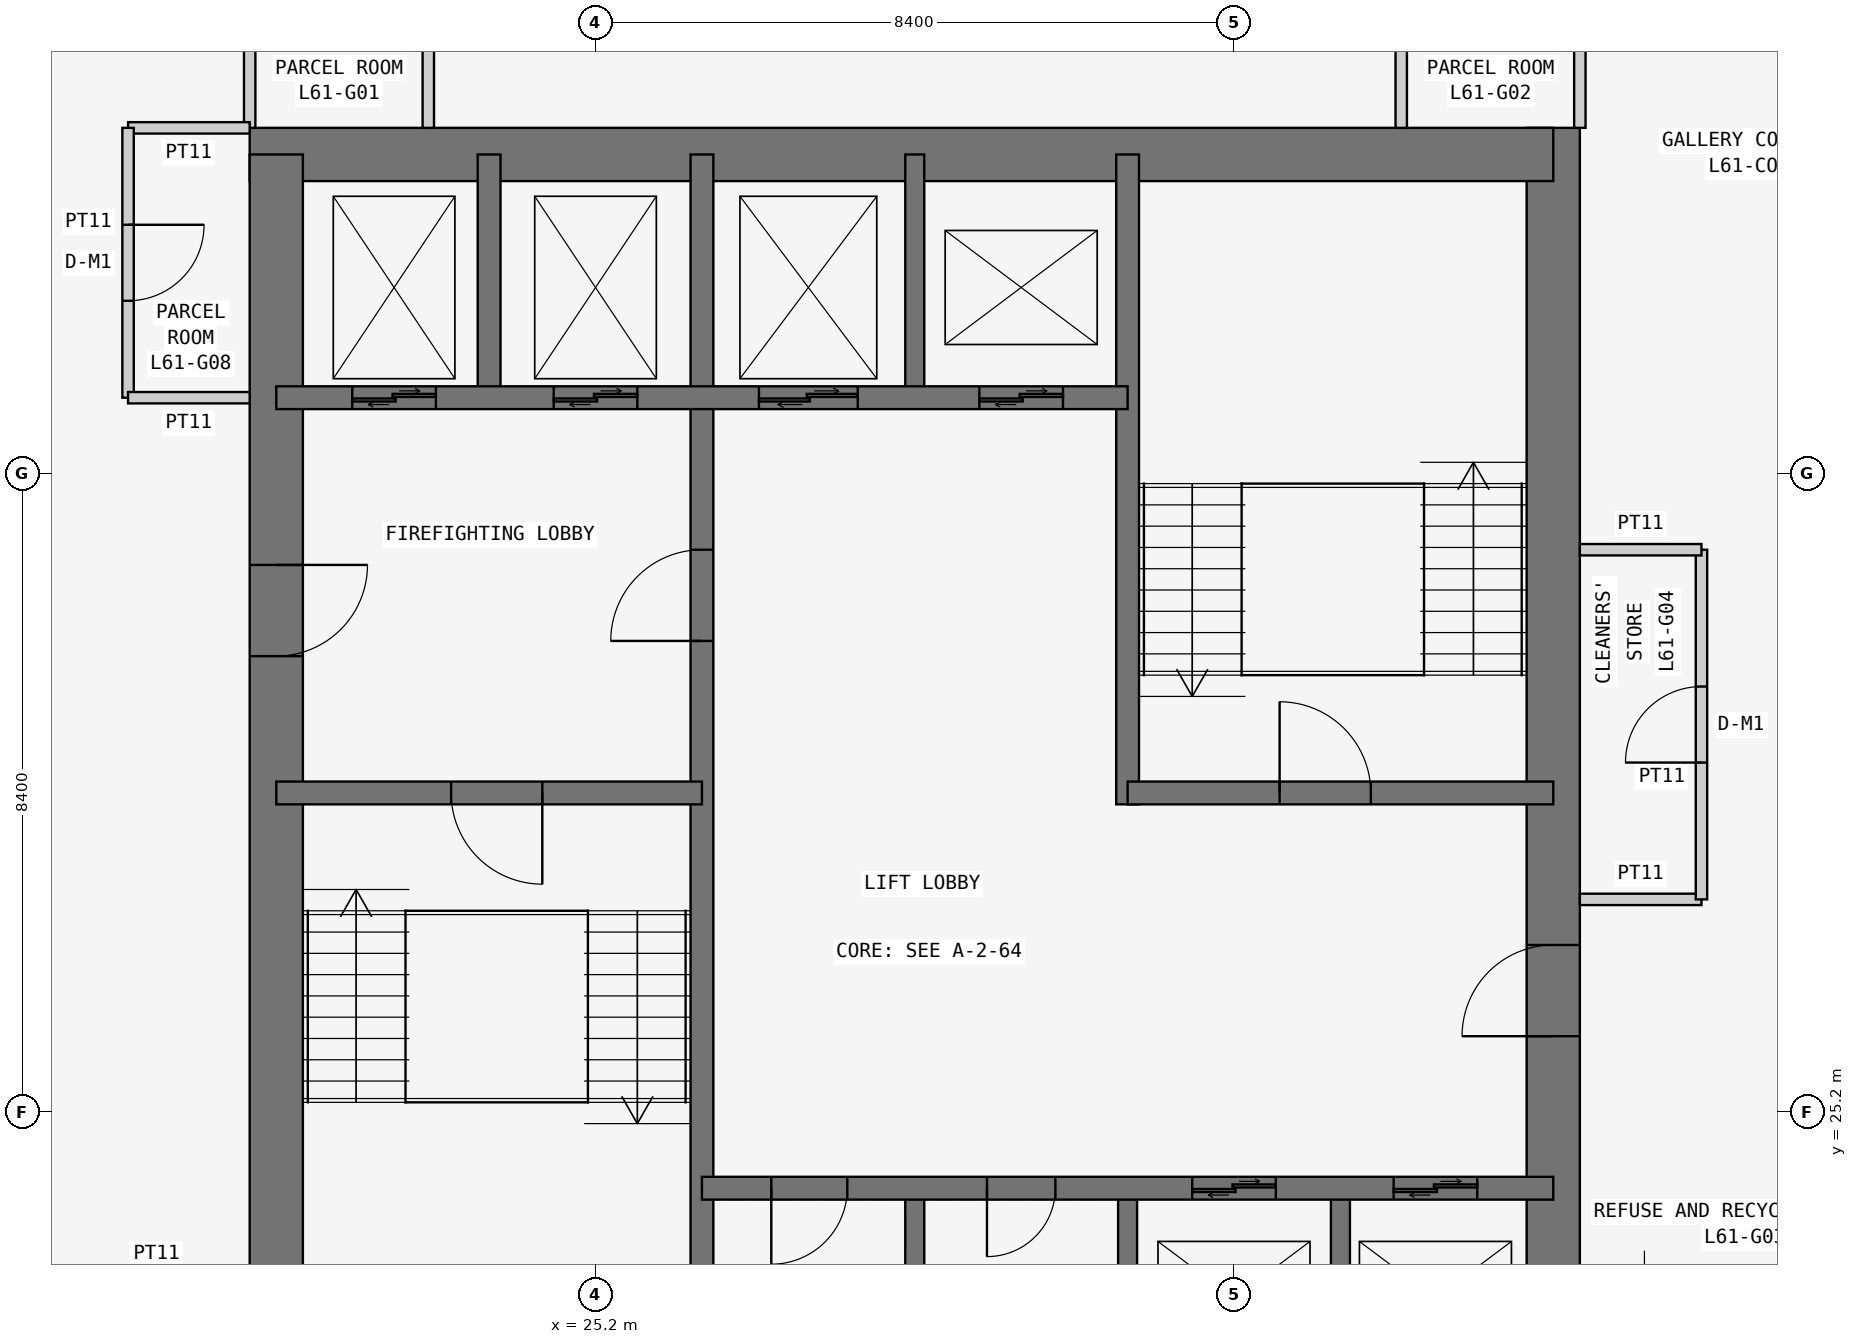
"""IFC4 building model, lengths in metres.
Left out: names, types, materials, properties, quantities, classifications, styles, units other than length and angle.
Written with IfcOpenShell. Run it as: python <this file> out.ifc"""

import sys

from ifc_helpers import new_model, si_unit, direction, frame, frame_2d, origin, place, context, subcontext, project, spatial, rectangle, extrude, element, fill, save


model = new_model("IFC4")
c1 = context("Model", 3, precision=1e-05, world=origin(), true_north=direction((0.0, 1.0)))
c2 = subcontext(c1, "Body", "Model", "MODEL_VIEW")
j1 = project(units=[si_unit("LENGTHUNIT", "METRE"), si_unit("PLANEANGLEUNIT", "RADIAN")], contexts=[c1])
p1 = place(None, origin())
s1 = spatial("IfcSite", under=j1, at=p1, CompositionType="ELEMENT")
p2 = place(p1, origin())
s2 = spatial("IfcBuilding", under=s1, at=p2, CompositionType="ELEMENT")
p3 = place(p2, frame((0.0, 0.0, 233.7)))
s3 = spatial("IfcBuildingStorey", under=s2, at=p3, CompositionType="ELEMENT", Elevation=233.7)
p4 = place(p3, frame((37.8, 21.0, 0.0), z_axis=(0.0, 0.0, 1.0), x_axis=(0.0, 1.0, 0.0)))
e1 = element("IfcWall", 1, at=p4, inside=s3, PredefinedType="SHEAR", context=c2, shape_type="SweptSolid", body=[
    extrude(rectangle(XDim=17.15, YDim=0.7, at=frame_2d((8.575, 0.0))), origin(), (0.0, 0.0, 1.0), 3.6),
])
p5 = place(p4, frame((5.2, 0.0, 0.0)))
e2 = element("IfcOpeningElement", 2, at=p5, cuts=e1, PredefinedType="OPENING", context=c2, shape_type="SweptSolid", body=[
    extrude(rectangle(XDim=1.2, YDim=2.1, at=frame_2d((0.6, 1.05))), frame((0.0, 0.36, 0.0), z_axis=(0.0, -1.0, 0.0), x_axis=(1.0, 0.0, 0.0)), (0.0, 0.0, 1.0), 0.72),
])
p6 = place(p3, frame((37.8, 37.8, 0.0), z_axis=(0.0, 0.0, 1.0), x_axis=(-1.0, 0.0, 0.0)))
e3 = element("IfcWall", 3, at=p6, inside=s3, PredefinedType="SHEAR", context=c2, shape_type="SweptSolid", body=[
    extrude(rectangle(XDim=17.15, YDim=0.7, at=frame_2d((8.575, 0.0))), origin(), (0.0, 0.0, 1.0), 3.6),
])
p7 = place(p3, frame((21.0, 37.8, 0.0), z_axis=(0.0, 0.0, 1.0), x_axis=(0.0, -1.0, 0.0)))
e4 = element("IfcWall", 4, at=p7, inside=s3, PredefinedType="SHEAR", context=c2, shape_type="SweptSolid", body=[
    extrude(rectangle(XDim=17.15, YDim=0.7, at=frame_2d((8.575, 0.0))), origin(), (0.0, 0.0, 1.0), 3.6),
])
p8 = place(p7, frame((5.4, 0.0, 0.0)))
e5 = element("IfcOpeningElement", 5, at=p8, cuts=e4, PredefinedType="OPENING", context=c2, shape_type="SweptSolid", body=[
    extrude(rectangle(XDim=1.2, YDim=2.1, at=frame_2d((0.6, 1.05))), frame((0.0, 0.36, 0.0), z_axis=(0.0, -1.0, 0.0), x_axis=(1.0, 0.0, 0.0)), (0.0, 0.0, 1.0), 0.72),
])
p9 = place(p3, frame((26.6, 21.0, 0.0), z_axis=(0.0, 0.0, 1.0), x_axis=(0.0, 1.0, 0.0)))
e6 = element("IfcWall", 6, at=p9, inside=s3, PredefinedType="SHEAR", context=c2, shape_type="SweptSolid", body=[
    extrude(rectangle(XDim=16.8, YDim=0.3, at=frame_2d((8.4, 0.0))), origin(), (0.0, 0.0, 1.0), 3.6),
])
p10 = place(p9, frame((10.4, 0.0, 0.0)))
e7 = element("IfcOpeningElement", 7, at=p10, cuts=e6, PredefinedType="OPENING", context=c2, shape_type="SweptSolid", body=[
    extrude(rectangle(XDim=1.2, YDim=2.1, at=frame_2d((0.6, 1.05))), frame((0.0, 0.16, 0.0), z_axis=(0.0, -1.0, 0.0), x_axis=(1.0, 0.0, 0.0)), (0.0, 0.0, 1.0), 0.32),
])
p11 = place(p3, frame((21.0, 29.4, 0.0), z_axis=(0.0, 0.0, 1.0), x_axis=(1.0, 0.0, 0.0)))
e8 = element("IfcWall", 8, at=p11, inside=s3, PredefinedType="SHEAR", context=c2, shape_type="SweptSolid", body=[
    extrude(rectangle(XDim=5.6, YDim=0.3, at=frame_2d((2.8, 0.0))), origin(), (0.0, 0.0, 1.0), 3.6),
])
p12 = place(p11, frame((2.3, 0.0, 0.0)))
e9 = element("IfcOpeningElement", 9, at=p12, cuts=e8, PredefinedType="OPENING", context=c2, shape_type="SweptSolid", body=[
    extrude(rectangle(XDim=1.2, YDim=2.1, at=frame_2d((0.6, 1.05))), frame((0.0, 0.16, 0.0), z_axis=(0.0, -1.0, 0.0), x_axis=(1.0, 0.0, 0.0)), (0.0, 0.0, 1.0), 0.32),
])
p13 = place(p3, frame((21.0, 34.6, 0.0), z_axis=(0.0, 0.0, 1.0), x_axis=(1.0, 0.0, 0.0)))
e10 = element("IfcWall", 10, at=p13, inside=s3, PredefinedType="SHEAR", context=c2, shape_type="SweptSolid", body=[
    extrude(rectangle(XDim=11.2, YDim=0.3, at=frame_2d((5.6, 0.0))), origin(), (0.0, 0.0, 1.0), 3.6),
])
p14 = place(p13, frame((9.25, 0.0, 0.0)))
e11 = element("IfcOpeningElement", 11, at=p14, cuts=e10, PredefinedType="OPENING", context=c2, shape_type="SweptSolid", body=[
    extrude(rectangle(XDim=1.1, YDim=2.1, at=frame_2d((0.55, 1.05))), frame((0.0, 0.16, 0.0), z_axis=(0.0, -1.0, 0.0), x_axis=(1.0, 0.0, 0.0)), (0.0, 0.0, 1.0), 0.32),
])
p15 = place(p13, frame((1.0, 0.0, 0.0)))
e12 = element("IfcOpeningElement", 12, at=p15, cuts=e10, PredefinedType="OPENING", context=c2, shape_type="SweptSolid", body=[
    extrude(rectangle(XDim=1.1, YDim=2.1, at=frame_2d((0.55, 1.05))), frame((0.0, 0.16, 0.0), z_axis=(0.0, -1.0, 0.0), x_axis=(1.0, 0.0, 0.0)), (0.0, 0.0, 1.0), 0.32),
])
p16 = place(p13, frame((3.65, 0.0, 0.0)))
e13 = element("IfcOpeningElement", 13, at=p16, cuts=e10, PredefinedType="OPENING", context=c2, shape_type="SweptSolid", body=[
    extrude(rectangle(XDim=1.1, YDim=2.1, at=frame_2d((0.55, 1.05))), frame((0.0, 0.16, 0.0), z_axis=(0.0, -1.0, 0.0), x_axis=(1.0, 0.0, 0.0)), (0.0, 0.0, 1.0), 0.32),
])
p17 = place(p13, frame((6.35, 0.0, 0.0)))
e14 = element("IfcOpeningElement", 14, at=p17, cuts=e10, PredefinedType="OPENING", context=c2, shape_type="SweptSolid", body=[
    extrude(rectangle(XDim=1.3, YDim=2.1, at=frame_2d((0.65, 1.05))), frame((0.0, 0.16, 0.0), z_axis=(0.0, -1.0, 0.0), x_axis=(1.0, 0.0, 0.0)), (0.0, 0.0, 1.0), 0.32),
])
p18 = place(p3, frame((23.8, 34.6, 0.0), z_axis=(0.0, 0.0, 1.0), x_axis=(0.0, 1.0, 0.0)))
e15 = element("IfcWall", 15, at=p18, inside=s3, PredefinedType="SHEAR", context=c2, shape_type="SweptSolid", body=[
    extrude(rectangle(XDim=3.2, YDim=0.3, at=frame_2d((1.6, 0.0))), origin(), (0.0, 0.0, 1.0), 3.6),
])
p19 = place(p3, frame((26.6, 24.2, 0.0), z_axis=(0.0, 0.0, 1.0), x_axis=(1.0, 0.0, 0.0)))
e16 = element("IfcWall", 16, at=p19, inside=s3, PredefinedType="SHEAR", context=c2, shape_type="SweptSolid", body=[
    extrude(rectangle(XDim=11.2, YDim=0.3, at=frame_2d((5.6, 0.0))), origin(), (0.0, 0.0, 1.0), 3.6),
])
p20 = place(p19, frame((0.913, 0.0, 0.0)))
e17 = element("IfcOpeningElement", 17, at=p20, cuts=e16, PredefinedType="OPENING", context=c2, shape_type="SweptSolid", body=[
    extrude(rectangle(XDim=1.0, YDim=2.1, at=frame_2d((0.5, 1.05))), frame((0.0, 0.16, 0.0), z_axis=(0.0, -1.0, 0.0), x_axis=(1.0, 0.0, 0.0)), (0.0, 0.0, 1.0), 0.32),
])
p21 = place(p19, frame((3.75, 0.0, 0.0)))
e18 = element("IfcOpeningElement", 18, at=p21, cuts=e16, PredefinedType="OPENING", context=c2, shape_type="SweptSolid", body=[
    extrude(rectangle(XDim=0.9, YDim=2.1, at=frame_2d((0.45, 1.05))), frame((0.0, 0.16, 0.0), z_axis=(0.0, -1.0, 0.0), x_axis=(1.0, 0.0, 0.0)), (0.0, 0.0, 1.0), 0.32),
])
p22 = place(p19, frame((6.45, 0.0, 0.0)))
e19 = element("IfcOpeningElement", 19, at=p22, cuts=e16, PredefinedType="OPENING", context=c2, shape_type="SweptSolid", body=[
    extrude(rectangle(XDim=1.1, YDim=2.1, at=frame_2d((0.55, 1.05))), frame((0.0, 0.16, 0.0), z_axis=(0.0, -1.0, 0.0), x_axis=(1.0, 0.0, 0.0)), (0.0, 0.0, 1.0), 0.32),
])
p23 = place(p19, frame((9.1, 0.0, 0.0)))
e20 = element("IfcOpeningElement", 20, at=p23, cuts=e16, PredefinedType="OPENING", context=c2, shape_type="SweptSolid", body=[
    extrude(rectangle(XDim=1.1, YDim=2.1, at=frame_2d((0.55, 1.05))), frame((0.0, 0.16, 0.0), z_axis=(0.0, -1.0, 0.0), x_axis=(1.0, 0.0, 0.0)), (0.0, 0.0, 1.0), 0.32),
])
p24 = place(p3, frame((32.2, 29.25, 0.0), z_axis=(0.0, 0.0, 1.0), x_axis=(0.0, 1.0, 0.0)))
e21 = element("IfcWall", 21, at=p24, inside=s3, PredefinedType="SHEAR", context=c2, shape_type="SweptSolid", body=[
    extrude(rectangle(XDim=8.55, YDim=0.3, at=frame_2d((4.275, 0.0))), origin(), (0.0, 0.0, 1.0), 3.6),
])
p25 = place(p3, frame((32.2, 29.4, 0.0), z_axis=(0.0, 0.0, 1.0), x_axis=(1.0, 0.0, 0.0)))
e22 = element("IfcWall", 22, at=p25, inside=s3, PredefinedType="SHEAR", context=c2, shape_type="SweptSolid", body=[
    extrude(rectangle(XDim=5.6, YDim=0.3, at=frame_2d((2.8, 0.0))), origin(), (0.0, 0.0, 1.0), 3.6),
])
p26 = place(p25, frame((2.0, 0.0, 0.0)))
e23 = element("IfcOpeningElement", 23, at=p26, cuts=e22, PredefinedType="OPENING", context=c2, shape_type="SweptSolid", body=[
    extrude(rectangle(XDim=1.2, YDim=2.1, at=frame_2d((0.6, 1.05))), frame((0.0, 0.16, 0.0), z_axis=(0.0, -1.0, 0.0), x_axis=(1.0, 0.0, 0.0)), (0.0, 0.0, 1.0), 0.32),
])
for number, where, z_axis, x_axis in (
    (24, (29.4, 21.0, 0.0), (0.0, 0.0, 1.0), (0.0, 1.0, 0.0)),
    (25, (32.2, 21.0, 0.0), (0.0, 0.0, 1.0), (0.0, 1.0, 0.0)),
    (26, (35.0, 21.0, 0.0), (0.0, 0.0, 1.0), (0.0, 1.0, 0.0)),
    (27, (29.4, 34.6, 0.0), (0.0, 0.0, 1.0), (0.0, 1.0, 0.0)),
):
    element("IfcWall", number, at=place(p3, frame(where, z_axis=z_axis, x_axis=x_axis)), inside=s3, PredefinedType="SHEAR", context=c2, shape_type="SweptSolid", body=[
        extrude(rectangle(XDim=3.2, YDim=0.25, at=frame_2d((1.6, 0.0))), origin(), (0.0, 0.0, 1.0), 3.6),
    ])
for number, where, z_axis, x_axis in (
    (28, (23.0, 38.15, 0.0), (0.0, 0.0, 1.0), (0.0, 1.0, 0.0)),
    (29, (20.65, 40.6, 0.0), (0.0, 0.0, 1.0), (0.0, -1.0, 0.0)),
    (30, (38.15, 38.15, 0.0), (0.0, 0.0, 1.0), (0.0, 1.0, 0.0)),
    (31, (35.8, 40.6, 0.0), (0.0, 0.0, 1.0), (0.0, -1.0, 0.0)),
):
    element("IfcWall", number, at=place(p3, frame(where, z_axis=z_axis, x_axis=x_axis)), inside=s3, PredefinedType="PARTITIONING", context=c2, shape_type="SweptSolid", body=[
        extrude(rectangle(XDim=2.45, YDim=0.15, at=frame_2d((1.225, 0.0))), origin(), (0.0, 0.0, 1.0), 3.45),
    ])
p27 = place(p3, frame((38.15, 28.0, 0.0), z_axis=(0.0, 0.0, 1.0), x_axis=(1.0, 0.0, 0.0)))
e32 = element("IfcWall", 32, at=p27, inside=s3, PredefinedType="PARTITIONING", context=c2, shape_type="SweptSolid", body=[
    extrude(rectangle(XDim=1.6, YDim=0.15, at=frame_2d((0.8, 0.0))), origin(), (0.0, 0.0, 1.0), 3.45),
])
p28 = place(p3, frame((39.75, 28.0, 0.0), z_axis=(0.0, 0.0, 1.0), x_axis=(0.0, 1.0, 0.0)))
e33 = element("IfcWall", 33, at=p28, inside=s3, PredefinedType="PARTITIONING", context=c2, shape_type="SweptSolid", body=[
    extrude(rectangle(XDim=4.6, YDim=0.15, at=frame_2d((2.3, 0.0))), origin(), (0.0, 0.0, 1.0), 3.45),
])
p29 = place(p28, frame((1.8, 0.0, 0.0)))
e34 = element("IfcOpeningElement", 34, at=p29, cuts=e33, PredefinedType="OPENING", context=c2, shape_type="SweptSolid", body=[
    extrude(rectangle(XDim=1.0, YDim=2.1, at=frame_2d((0.5, 1.05))), frame((0.0, 0.085, 0.0), z_axis=(0.0, -1.0, 0.0), x_axis=(1.0, 0.0, 0.0)), (0.0, 0.0, 1.0), 0.17),
])
p30 = place(p3, frame((39.75, 32.6, 0.0), z_axis=(0.0, 0.0, 1.0), x_axis=(-1.0, 0.0, 0.0)))
e35 = element("IfcWall", 35, at=p30, inside=s3, PredefinedType="PARTITIONING", context=c2, shape_type="SweptSolid", body=[
    extrude(rectangle(XDim=1.6, YDim=0.15, at=frame_2d((0.8, 0.0))), origin(), (0.0, 0.0, 1.0), 3.45),
])
p31 = place(p3, frame((20.65, 38.15, 0.0), z_axis=(0.0, 0.0, 1.0), x_axis=(-1.0, 0.0, 0.0)))
e36 = element("IfcWall", 36, at=p31, inside=s3, PredefinedType="PARTITIONING", context=c2, shape_type="SweptSolid", body=[
    extrude(rectangle(XDim=1.6, YDim=0.15, at=frame_2d((0.8, 0.0))), origin(), (0.0, 0.0, 1.0), 3.45),
])
p32 = place(p3, frame((19.05, 38.15, 0.0), z_axis=(0.0, 0.0, 1.0), x_axis=(0.0, -1.0, 0.0)))
e37 = element("IfcWall", 37, at=p32, inside=s3, PredefinedType="PARTITIONING", context=c2, shape_type="SweptSolid", body=[
    extrude(rectangle(XDim=3.55, YDim=0.15, at=frame_2d((1.775, 0.0))), origin(), (0.0, 0.0, 1.0), 3.45),
])
p33 = place(p32, frame((1.275, 0.0, 0.0)))
e38 = element("IfcOpeningElement", 38, at=p33, cuts=e37, PredefinedType="OPENING", context=c2, shape_type="SweptSolid", body=[
    extrude(rectangle(XDim=1.0, YDim=2.1, at=frame_2d((0.5, 1.05))), frame((0.0, 0.085, 0.0), z_axis=(0.0, -1.0, 0.0), x_axis=(1.0, 0.0, 0.0)), (0.0, 0.0, 1.0), 0.17),
])
p34 = place(p3, frame((19.05, 34.6, 0.0), z_axis=(0.0, 0.0, 1.0), x_axis=(1.0, 0.0, 0.0)))
e39 = element("IfcWall", 39, at=p34, inside=s3, PredefinedType="PARTITIONING", context=c2, shape_type="SweptSolid", body=[
    extrude(rectangle(XDim=1.6, YDim=0.15, at=frame_2d((0.8, 0.0))), origin(), (0.0, 0.0, 1.0), 3.45),
])
p35 = place(p29, origin())
e40 = element("IfcDoor", 40, at=p35, inside=s3, OperationType="SINGLE_SWING_LEFT", PredefinedType="DOOR", context=c2, shape_type="SweptSolid", body=[
    extrude(rectangle(XDim=1.0, YDim=2.1, at=frame_2d((0.5, 1.05))), frame((0.0, 0.025, 0.0), z_axis=(0.0, -1.0, 0.0), x_axis=(1.0, 0.0, 0.0)), (0.0, 0.0, 1.0), 0.05),
])
fill(e34, e40)
p36 = place(p33, origin())
e41 = element("IfcDoor", 41, at=p36, inside=s3, OperationType="SINGLE_SWING_LEFT", PredefinedType="DOOR", context=c2, shape_type="SweptSolid", body=[
    extrude(rectangle(XDim=1.0, YDim=2.1, at=frame_2d((0.5, 1.05))), frame((0.0, 0.025, 0.0), z_axis=(0.0, -1.0, 0.0), x_axis=(1.0, 0.0, 0.0)), (0.0, 0.0, 1.0), 0.05),
])
fill(e38, e41)
p37 = place(p8, origin())
e42 = element("IfcDoor", 42, at=p37, inside=s3, OperationType="SINGLE_SWING_LEFT", PredefinedType="DOOR", context=c2, shape_type="SweptSolid", body=[
    extrude(rectangle(XDim=1.2, YDim=2.1, at=frame_2d((0.6, 1.05))), frame((0.0, 0.025, 0.0), z_axis=(0.0, -1.0, 0.0), x_axis=(1.0, 0.0, 0.0)), (0.0, 0.0, 1.0), 0.05),
])
fill(e5, e42)
p38 = place(p12, frame((1.2, 0.0, 0.0), z_axis=(0.0, 0.0, 1.0), x_axis=(-1.0, 0.0, 0.0)))
e43 = element("IfcDoor", 43, at=p38, inside=s3, OperationType="SINGLE_SWING_LEFT", PredefinedType="DOOR", context=c2, shape_type="SweptSolid", body=[
    extrude(rectangle(XDim=1.2, YDim=2.1, at=frame_2d((0.6, 1.05))), frame((0.0, 0.025, 0.0), z_axis=(0.0, -1.0, 0.0), x_axis=(1.0, 0.0, 0.0)), (0.0, 0.0, 1.0), 0.05),
])
fill(e9, e43)
p39 = place(p10, origin())
e44 = element("IfcDoor", 44, at=p39, inside=s3, OperationType="SINGLE_SWING_LEFT", PredefinedType="DOOR", context=c2, shape_type="SweptSolid", body=[
    extrude(rectangle(XDim=1.2, YDim=2.1, at=frame_2d((0.6, 1.05))), frame((0.0, 0.025, 0.0), z_axis=(0.0, -1.0, 0.0), x_axis=(1.0, 0.0, 0.0)), (0.0, 0.0, 1.0), 0.05),
])
fill(e7, e44)
p40 = place(p5, origin())
e45 = element("IfcDoor", 45, at=p40, inside=s3, OperationType="SINGLE_SWING_LEFT", PredefinedType="DOOR", context=c2, shape_type="SweptSolid", body=[
    extrude(rectangle(XDim=1.2, YDim=2.1, at=frame_2d((0.6, 1.05))), frame((0.0, 0.025, 0.0), z_axis=(0.0, -1.0, 0.0), x_axis=(1.0, 0.0, 0.0)), (0.0, 0.0, 1.0), 0.05),
])
fill(e2, e45)
p41 = place(p26, origin())
e46 = element("IfcDoor", 46, at=p41, inside=s3, OperationType="SINGLE_SWING_LEFT", PredefinedType="DOOR", context=c2, shape_type="SweptSolid", body=[
    extrude(rectangle(XDim=1.2, YDim=2.1, at=frame_2d((0.6, 1.05))), frame((0.0, 0.025, 0.0), z_axis=(0.0, -1.0, 0.0), x_axis=(1.0, 0.0, 0.0)), (0.0, 0.0, 1.0), 0.05),
])
fill(e23, e46)
p42 = place(p20, frame((1.0, 0.0, 0.0), z_axis=(0.0, 0.0, 1.0), x_axis=(-1.0, 0.0, 0.0)))
e47 = element("IfcDoor", 47, at=p42, inside=s3, OperationType="SINGLE_SWING_RIGHT", PredefinedType="DOOR", context=c2, shape_type="SweptSolid", body=[
    extrude(rectangle(XDim=1.0, YDim=2.1, at=frame_2d((0.5, 1.05))), frame((0.0, 0.025, 0.0), z_axis=(0.0, -1.0, 0.0), x_axis=(1.0, 0.0, 0.0)), (0.0, 0.0, 1.0), 0.05),
])
fill(e17, e47)
p43 = place(p21, frame((0.9, 0.0, 0.0), z_axis=(0.0, 0.0, 1.0), x_axis=(-1.0, 0.0, 0.0)))
e48 = element("IfcDoor", 48, at=p43, inside=s3, OperationType="SINGLE_SWING_RIGHT", PredefinedType="DOOR", context=c2, shape_type="SweptSolid", body=[
    extrude(rectangle(XDim=0.9, YDim=2.1, at=frame_2d((0.45, 1.05))), frame((0.0, 0.025, 0.0), z_axis=(0.0, -1.0, 0.0), x_axis=(1.0, 0.0, 0.0)), (0.0, 0.0, 1.0), 0.05),
])
fill(e18, e48)
p44 = place(p22, origin())
e49 = element("IfcDoor", 49, at=p44, inside=s3, OperationType="DOUBLE_DOOR_SLIDING", PredefinedType="DOOR", context=c2, shape_type="SweptSolid", body=[
    extrude(rectangle(XDim=1.1, YDim=2.1, at=frame_2d((0.55, 1.05))), frame((0.0, 0.025, 0.0), z_axis=(0.0, -1.0, 0.0), x_axis=(1.0, 0.0, 0.0)), (0.0, 0.0, 1.0), 0.05),
])
fill(e19, e49)
p45 = place(p23, origin())
e50 = element("IfcDoor", 50, at=p45, inside=s3, OperationType="DOUBLE_DOOR_SLIDING", PredefinedType="DOOR", context=c2, shape_type="SweptSolid", body=[
    extrude(rectangle(XDim=1.1, YDim=2.1, at=frame_2d((0.55, 1.05))), frame((0.0, 0.025, 0.0), z_axis=(0.0, -1.0, 0.0), x_axis=(1.0, 0.0, 0.0)), (0.0, 0.0, 1.0), 0.05),
])
fill(e20, e50)
p46 = place(p14, origin())
e51 = element("IfcDoor", 51, at=p46, inside=s3, OperationType="DOUBLE_DOOR_SLIDING", PredefinedType="DOOR", context=c2, shape_type="SweptSolid", body=[
    extrude(rectangle(XDim=1.1, YDim=2.1, at=frame_2d((0.55, 1.05))), frame((0.0, 0.025, 0.0), z_axis=(0.0, -1.0, 0.0), x_axis=(1.0, 0.0, 0.0)), (0.0, 0.0, 1.0), 0.05),
])
fill(e11, e51)
p47 = place(p15, origin())
e52 = element("IfcDoor", 52, at=p47, inside=s3, OperationType="DOUBLE_DOOR_SLIDING", PredefinedType="DOOR", context=c2, shape_type="SweptSolid", body=[
    extrude(rectangle(XDim=1.1, YDim=2.1, at=frame_2d((0.55, 1.05))), frame((0.0, 0.025, 0.0), z_axis=(0.0, -1.0, 0.0), x_axis=(1.0, 0.0, 0.0)), (0.0, 0.0, 1.0), 0.05),
])
fill(e12, e52)
p48 = place(p16, origin())
e53 = element("IfcDoor", 53, at=p48, inside=s3, OperationType="DOUBLE_DOOR_SLIDING", PredefinedType="DOOR", context=c2, shape_type="SweptSolid", body=[
    extrude(rectangle(XDim=1.1, YDim=2.1, at=frame_2d((0.55, 1.05))), frame((0.0, 0.025, 0.0), z_axis=(0.0, -1.0, 0.0), x_axis=(1.0, 0.0, 0.0)), (0.0, 0.0, 1.0), 0.05),
])
fill(e13, e53)
p49 = place(p17, origin())
e54 = element("IfcDoor", 54, at=p49, inside=s3, OperationType="DOUBLE_DOOR_SLIDING", PredefinedType="DOOR", context=c2, shape_type="SweptSolid", body=[
    extrude(rectangle(XDim=1.3, YDim=2.1, at=frame_2d((0.65, 1.05))), frame((0.0, 0.025, 0.0), z_axis=(0.0, -1.0, 0.0), x_axis=(1.0, 0.0, 0.0)), (0.0, 0.0, 1.0), 0.05),
])
fill(e14, e54)
save(model, sys.argv[1])
